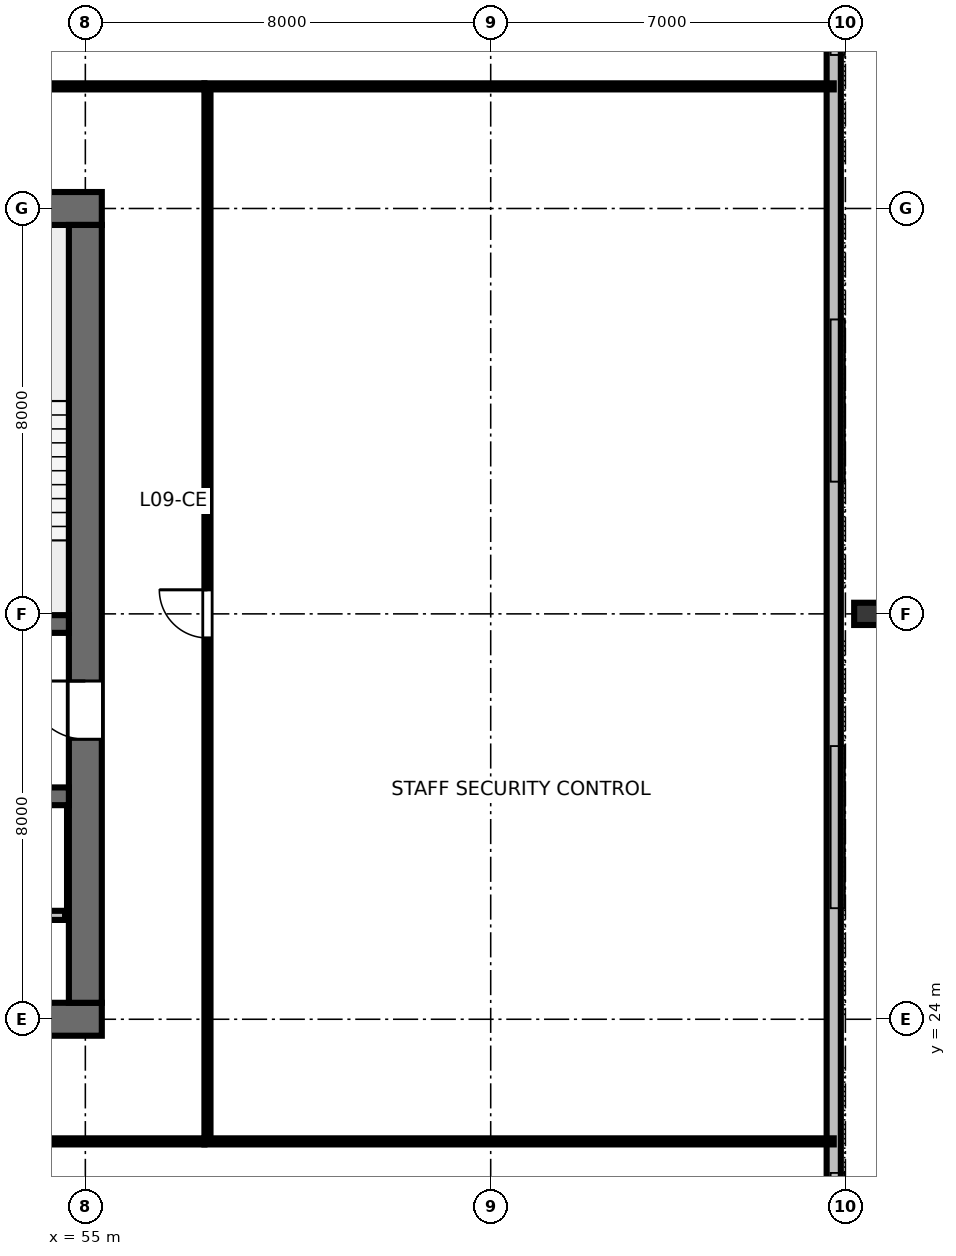
"""IFC4 building model, lengths in metres.
Left out: names, types, materials, properties, quantities, classifications, styles, units other than length and angle.
Written with IfcOpenShell. Run it as: python <this file> out.ifc"""

import sys

from ifc_helpers import new_model, si_unit, direction, frame, frame_2d, origin, origin_2d, place, context, subcontext, project, spatial, rectangle, i_section, extrude, element, fill, save


model = new_model("IFC4")
c1 = context("Model", 3, precision=1e-05, world=origin(), true_north=direction((0.0, 1.0)))
c2 = subcontext(c1, "Body", "Model", "MODEL_VIEW")
j1 = project(units=[si_unit("LENGTHUNIT", "METRE"), si_unit("PLANEANGLEUNIT", "RADIAN")], contexts=[c1])
p1 = place(None, origin())
s1 = spatial("IfcSite", under=j1, at=p1, CompositionType="ELEMENT")
p2 = place(p1, origin())
s2 = spatial("IfcBuilding", under=s1, at=p2, CompositionType="ELEMENT")
p3 = place(p2, frame((0.0, 0.0, 38.8)))
s3 = spatial("IfcBuildingStorey", under=s2, at=p3, CompositionType="ELEMENT", Elevation=38.8)
p4 = place(p3, frame((36.675, 24.0, 0.0), z_axis=(0.0, 0.0, 1.0), x_axis=(1.0, 0.0, 0.0)))
e1 = element("IfcWall", 1, at=p4, inside=s3, PredefinedType="SHEAR", context=c2, shape_type="SweptSolid", body=[
    extrude(rectangle(XDim=18.65, YDim=0.65, at=frame_2d((9.325, 0.0))), origin(), (0.0, 0.0, 1.0), 3.36),
])
p5 = place(p4, frame((5.725, 0.0, 0.0)))
e2 = element("IfcOpeningElement", 2, at=p5, cuts=e1, PredefinedType="OPENING", context=c2, shape_type="SweptSolid", body=[
    extrude(rectangle(XDim=1.6, YDim=2.15, at=frame_2d((0.8, 1.075))), frame((0.0, 0.335, 0.0), z_axis=(0.0, -1.0, 0.0), x_axis=(1.0, 0.0, 0.0)), (0.0, 0.0, 1.0), 0.67),
])
p6 = place(p4, frame((12.125, 0.0, 0.0)))
e3 = element("IfcOpeningElement", 3, at=p6, cuts=e1, PredefinedType="OPENING", context=c2, shape_type="SweptSolid", body=[
    extrude(rectangle(XDim=1.6, YDim=2.15, at=frame_2d((0.8, 1.075))), frame((0.0, 0.335, 0.0), z_axis=(0.0, -1.0, 0.0), x_axis=(1.0, 0.0, 0.0)), (0.0, 0.0, 1.0), 0.67),
])
p7 = place(p3, frame((36.675, 40.0, 0.0), z_axis=(0.0, 0.0, 1.0), x_axis=(1.0, 0.0, 0.0)))
e4 = element("IfcWall", 4, at=p7, inside=s3, PredefinedType="SHEAR", context=c2, shape_type="SweptSolid", body=[
    extrude(rectangle(XDim=18.65, YDim=0.65, at=frame_2d((9.325, 0.0))), origin(), (0.0, 0.0, 1.0), 3.36),
])
p8 = place(p7, frame((8.825, 0.0, 0.0)))
e5 = element("IfcOpeningElement", 5, at=p8, cuts=e4, PredefinedType="OPENING", context=c2, shape_type="SweptSolid", body=[
    extrude(rectangle(XDim=1.0, YDim=2.15, at=frame_2d((0.5, 1.075))), frame((0.0, 0.335, 0.0), z_axis=(0.0, -1.0, 0.0), x_axis=(1.0, 0.0, 0.0)), (0.0, 0.0, 1.0), 0.67),
])
p9 = place(p3, frame((55.0, 24.325, 0.0), z_axis=(0.0, 0.0, 1.0), x_axis=(0.0, 1.0, 0.0)))
e6 = element("IfcWall", 6, at=p9, inside=s3, PredefinedType="SHEAR", context=c2, shape_type="SweptSolid", body=[
    extrude(rectangle(XDim=15.35, YDim=0.65, at=frame_2d((7.675, 0.0))), origin(), (0.0, 0.0, 1.0), 3.36),
])
p10 = place(p9, frame((5.2, 0.0, 0.0)))
e7 = element("IfcOpeningElement", 7, at=p10, cuts=e6, PredefinedType="OPENING", context=c2, shape_type="SweptSolid", body=[
    extrude(rectangle(XDim=1.15, YDim=2.15, at=frame_2d((0.575, 1.075))), frame((0.0, 0.335, 0.0), z_axis=(0.0, -1.0, 0.0), x_axis=(1.0, 0.0, 0.0)), (0.0, 0.0, 1.0), 0.67),
])
p11 = place(p3, frame((37.325, 31.8, 0.0), z_axis=(0.0, 0.0, 1.0), x_axis=(1.0, 0.0, 0.0)))
e8 = element("IfcWall", 8, at=p11, inside=s3, PredefinedType="SHEAR", context=c2, shape_type="SweptSolid", body=[
    extrude(rectangle(XDim=17.35, YDim=0.35, at=frame_2d((8.675, 0.0))), origin(), (0.0, 0.0, 1.0), 3.36),
])
p12 = place(p11, frame((0.725, 0.0, 0.0)))
e9 = element("IfcOpeningElement", 9, at=p12, cuts=e8, PredefinedType="OPENING", context=c2, shape_type="SweptSolid", body=[
    extrude(rectangle(XDim=1.1, YDim=2.15, at=frame_2d((0.55, 1.075))), frame((0.0, 0.185, 0.0), z_axis=(0.0, -1.0, 0.0), x_axis=(1.0, 0.0, 0.0)), (0.0, 0.0, 1.0), 0.37),
])
p13 = place(p11, frame((14.625, 0.0, 0.0)))
e10 = element("IfcOpeningElement", 10, at=p13, cuts=e8, PredefinedType="OPENING", context=c2, shape_type="SweptSolid", body=[
    extrude(rectangle(XDim=1.1, YDim=2.15, at=frame_2d((0.55, 1.075))), frame((0.0, 0.185, 0.0), z_axis=(0.0, -1.0, 0.0), x_axis=(1.0, 0.0, 0.0)), (0.0, 0.0, 1.0), 0.37),
])
p14 = place(p3, frame((37.325, 28.4, 0.0), z_axis=(0.0, 0.0, 1.0), x_axis=(1.0, 0.0, 0.0)))
e11 = element("IfcWall", 11, at=p14, inside=s3, PredefinedType="SHEAR", context=c2, shape_type="SweptSolid", body=[
    extrude(rectangle(XDim=17.35, YDim=0.35, at=frame_2d((8.675, 0.0))), origin(), (0.0, 0.0, 1.0), 3.36),
])
p15 = place(p3, frame((70.43, 32.0, 0.0), z_axis=(0.0, 0.0, 1.0), x_axis=(0.0, 1.0, 0.0)))
e12 = element("IfcColumn", 12, at=p15, inside=s3, PredefinedType="COLUMN", context=c2, shape_type="SweptSolid", body=[
    extrude(i_section(OverallWidth=0.439, OverallDepth=0.514, WebThickness=0.06, FlangeThickness=0.097, FilletRadius=0.025, at=origin_2d()), origin(), (0.0, 0.0, 1.0), 3.358),
])
p16 = place(p3, frame((69.77, 14.26, 0.0), z_axis=(0.0, 0.0, 1.0), x_axis=(0.0, 1.0, 0.0)))
e13 = element("IfcWall", 13, at=p16, inside=s3, PredefinedType="STANDARD", context=c2, shape_type="SweptSolid", body=[
    extrude(rectangle(XDim=35.48, YDim=0.28, at=frame_2d((17.74, 0.0))), origin(), (0.0, 0.0, 1.0), 3.36),
])
p17 = place(p3, frame((37.4, 26.05, 0.0), z_axis=(0.0, 0.0, 1.0), x_axis=(1.0, 0.0, 0.0)))
e14 = element("IfcWall", 14, at=p17, inside=s3, PredefinedType="PARTITIONING", context=c2, shape_type="SweptSolid", body=[
    extrude(rectangle(XDim=17.2, YDim=0.18, at=frame_2d((8.6, 0.0))), origin(), (0.0, 0.0, 1.0), 3.36),
])
p18 = place(p17, frame((1.1, 0.0, 0.0)))
e15 = element("IfcOpeningElement", 15, at=p18, cuts=e14, PredefinedType="OPENING", context=c2, shape_type="SweptSolid", body=[
    extrude(rectangle(XDim=1.05, YDim=2.15, at=frame_2d((0.525, 1.075))), frame((0.0, 0.1, 0.0), z_axis=(0.0, -1.0, 0.0), x_axis=(1.0, 0.0, 0.0)), (0.0, 0.0, 1.0), 0.2),
])
p19 = place(p17, frame((3.0, 0.0, 0.0)))
e16 = element("IfcOpeningElement", 16, at=p19, cuts=e14, PredefinedType="OPENING", context=c2, shape_type="SweptSolid", body=[
    extrude(rectangle(XDim=1.05, YDim=2.15, at=frame_2d((0.525, 1.075))), frame((0.0, 0.1, 0.0), z_axis=(0.0, -1.0, 0.0), x_axis=(1.0, 0.0, 0.0)), (0.0, 0.0, 1.0), 0.2),
])
p20 = place(p3, frame((34.65, 21.59, 0.0), z_axis=(0.0, 0.0, 1.0), x_axis=(1.0, 0.0, 0.0)))
e17 = element("IfcWall", 17, at=p20, inside=s3, PredefinedType="PARTITIONING", context=c2, shape_type="SweptSolid", body=[
    extrude(rectangle(XDim=22.7, YDim=0.12, at=frame_2d((11.35, 0.0))), origin(), (0.0, 0.0, 1.0), 2.64),
])
p21 = place(p20, frame((2.959, 0.0, 0.0)))
e18 = element("IfcOpeningElement", 18, at=p21, cuts=e17, PredefinedType="OPENING", context=c2, shape_type="SweptSolid", body=[
    extrude(rectangle(XDim=0.95, YDim=2.15, at=frame_2d((0.475, 1.075))), frame((0.0, 0.07, 0.0), z_axis=(0.0, -1.0, 0.0), x_axis=(1.0, 0.0, 0.0)), (0.0, 0.0, 1.0), 0.14),
])
p22 = place(p20, frame((7.709, 0.0, 0.0)))
e19 = element("IfcOpeningElement", 19, at=p22, cuts=e17, PredefinedType="OPENING", context=c2, shape_type="SweptSolid", body=[
    extrude(rectangle(XDim=0.95, YDim=2.15, at=frame_2d((0.475, 1.075))), frame((0.0, 0.07, 0.0), z_axis=(0.0, -1.0, 0.0), x_axis=(1.0, 0.0, 0.0)), (0.0, 0.0, 1.0), 0.14),
])
p23 = place(p20, frame((11.204, 0.0, 0.0)))
e20 = element("IfcOpeningElement", 20, at=p23, cuts=e17, PredefinedType="OPENING", context=c2, shape_type="SweptSolid", body=[
    extrude(rectangle(XDim=0.95, YDim=2.15, at=frame_2d((0.475, 1.075))), frame((0.0, 0.07, 0.0), z_axis=(0.0, -1.0, 0.0), x_axis=(1.0, 0.0, 0.0)), (0.0, 0.0, 1.0), 0.14),
])
p24 = place(p20, frame((17.665, 0.0, 0.0)))
e21 = element("IfcOpeningElement", 21, at=p24, cuts=e17, PredefinedType="OPENING", context=c2, shape_type="SweptSolid", body=[
    extrude(rectangle(XDim=0.95, YDim=2.15, at=frame_2d((0.475, 1.075))), frame((0.0, 0.07, 0.0), z_axis=(0.0, -1.0, 0.0), x_axis=(1.0, 0.0, 0.0)), (0.0, 0.0, 1.0), 0.14),
])
p25 = place(p3, frame((34.65, 42.41, 0.0), z_axis=(0.0, 0.0, 1.0), x_axis=(1.0, 0.0, 0.0)))
e22 = element("IfcWall", 22, at=p25, inside=s3, PredefinedType="PARTITIONING", context=c2, shape_type="SweptSolid", body=[
    extrude(rectangle(XDim=22.7, YDim=0.12, at=frame_2d((11.35, 0.0))), origin(), (0.0, 0.0, 1.0), 2.64),
])
p26 = place(p25, frame((10.875, 0.0, 0.0)))
e23 = element("IfcOpeningElement", 23, at=p26, cuts=e22, PredefinedType="OPENING", context=c2, shape_type="SweptSolid", body=[
    extrude(rectangle(XDim=0.95, YDim=2.15, at=frame_2d((0.475, 1.075))), frame((0.0, 0.07, 0.0), z_axis=(0.0, -1.0, 0.0), x_axis=(1.0, 0.0, 0.0)), (0.0, 0.0, 1.0), 0.14),
])
p27 = place(p3, frame((57.41, 21.65, 0.0), z_axis=(0.0, 0.0, 1.0), x_axis=(0.0, 1.0, 0.0)))
e24 = element("IfcWall", 24, at=p27, inside=s3, PredefinedType="PARTITIONING", context=c2, shape_type="SweptSolid", body=[
    extrude(rectangle(XDim=20.7, YDim=0.12, at=frame_2d((10.35, 0.0))), origin(), (0.0, 0.0, 1.0), 2.64),
])
p28 = place(p27, frame((9.875, 0.0, 0.0)))
e25 = element("IfcOpeningElement", 25, at=p28, cuts=e24, PredefinedType="OPENING", context=c2, shape_type="SweptSolid", body=[
    extrude(rectangle(XDim=0.95, YDim=2.15, at=frame_2d((0.475, 1.075))), frame((0.0, 0.07, 0.0), z_axis=(0.0, -1.0, 0.0), x_axis=(1.0, 0.0, 0.0)), (0.0, 0.0, 1.0), 0.14),
])
for number, where, z_axis, x_axis in (
    (26, (57.35, 21.59, 0.0), (0.0, 0.0, 1.0), (1.0, 0.0, 0.0)),
    (27, (57.35, 42.41, 0.0), (0.0, 0.0, 1.0), (1.0, 0.0, 0.0)),
):
    element("IfcWall", number, at=place(p3, frame(where, z_axis=z_axis, x_axis=x_axis)), inside=s3, PredefinedType="PARTITIONING", context=c2, shape_type="SweptSolid", body=[
        extrude(rectangle(XDim=12.42, YDim=0.12, at=frame_2d((6.21, 0.0))), origin(), (0.0, 0.0, 1.0), 2.64),
    ])
p29 = place(p10, origin())
e28 = element("IfcDoor", 28, at=p29, inside=s3, OperationType="SINGLE_SWING_RIGHT", PredefinedType="DOOR", context=c2, shape_type="SweptSolid", body=[
    extrude(rectangle(XDim=1.15, YDim=2.15, at=frame_2d((0.575, 1.075))), frame((0.0, 0.025, 0.0), z_axis=(0.0, -1.0, 0.0), x_axis=(1.0, 0.0, 0.0)), (0.0, 0.0, 1.0), 0.05),
])
fill(e7, e28)
p30 = place(p28, origin())
e29 = element("IfcDoor", 29, at=p30, inside=s3, OperationType="SINGLE_SWING_RIGHT", PredefinedType="DOOR", context=c2, shape_type="SweptSolid", body=[
    extrude(rectangle(XDim=0.95, YDim=2.15, at=frame_2d((0.475, 1.075))), frame((0.0, 0.025, 0.0), z_axis=(0.0, -1.0, 0.0), x_axis=(1.0, 0.0, 0.0)), (0.0, 0.0, 1.0), 0.05),
])
fill(e25, e29)
save(model, sys.argv[1])
